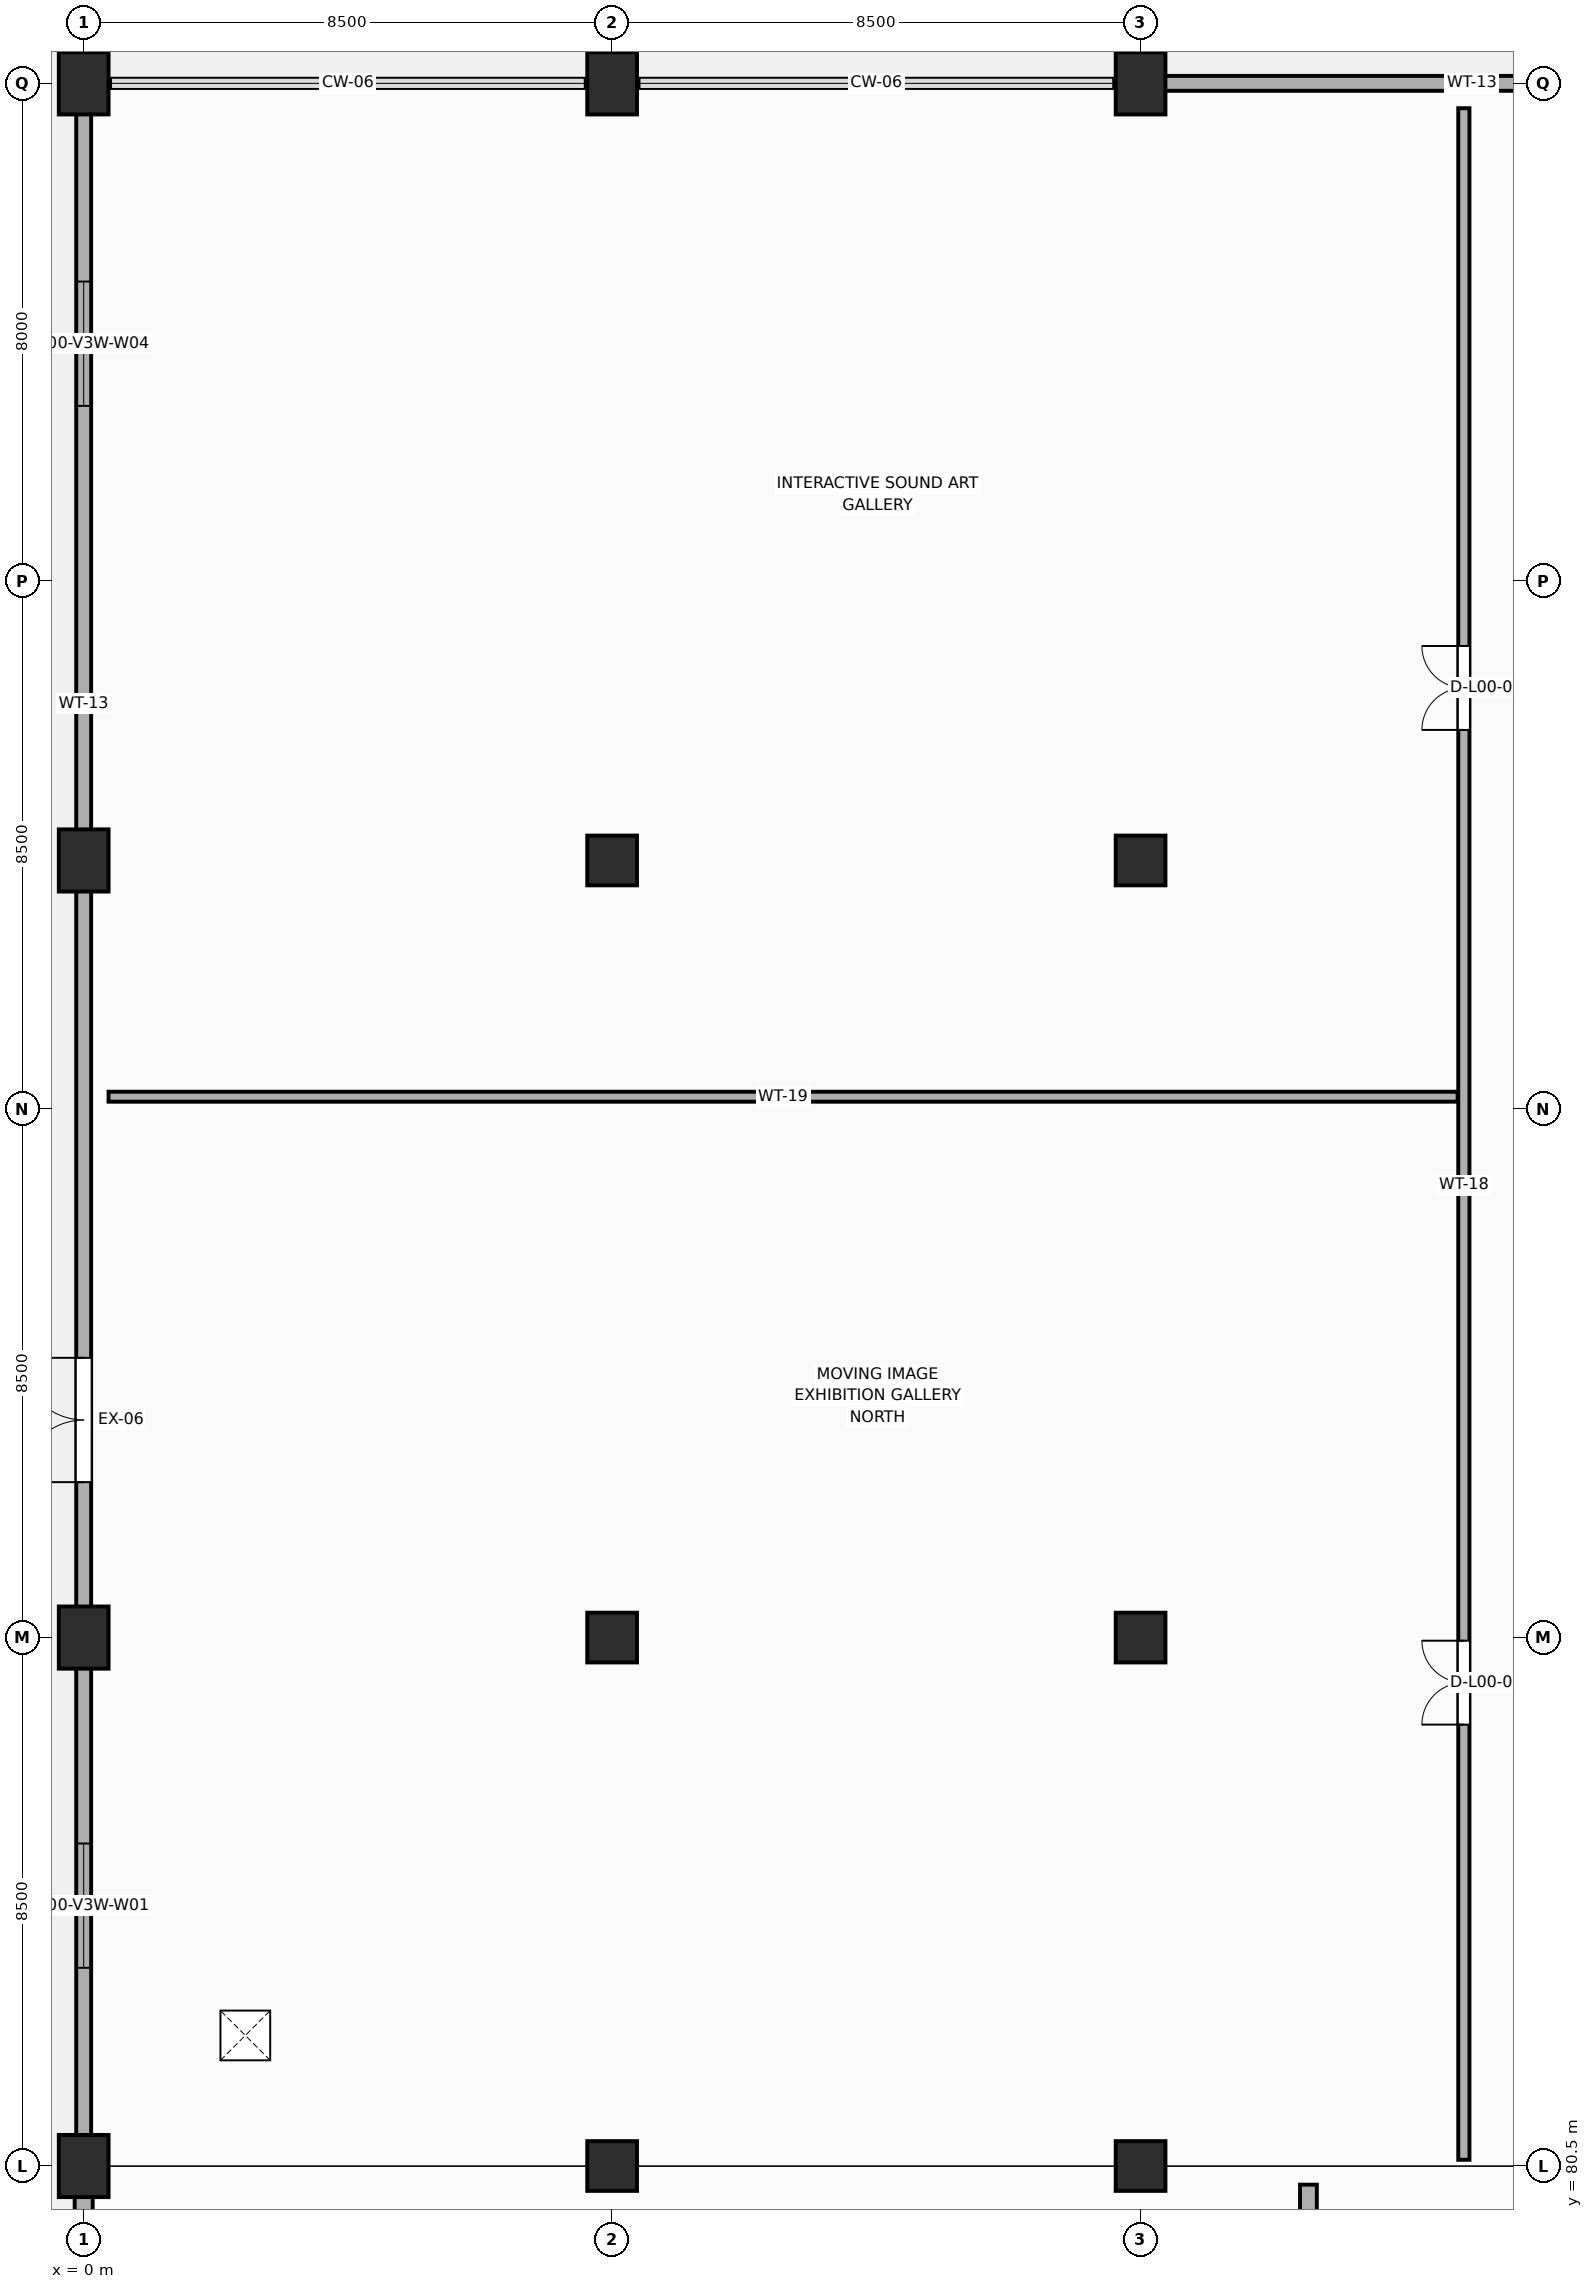
"""IFC4 building model, lengths in metres.
Left out: names, types, materials, properties, quantities, classifications, styles, units other than length and angle.
Written with IfcOpenShell. Run it as: python <this file> out.ifc"""

import sys

from ifc_helpers import new_model, si_unit, direction, frame, frame_2d, origin, origin_2d, place, context, subcontext, project, spatial, rectangle, extrude, element, fill, save


model = new_model("IFC4")
c1 = context("Model", 3, precision=1e-05, world=origin(), true_north=direction((0.0, 1.0)))
c2 = subcontext(c1, "Body", "Model", "MODEL_VIEW")
j1 = project(units=[si_unit("LENGTHUNIT", "METRE"), si_unit("PLANEANGLEUNIT", "RADIAN")], contexts=[c1])
p1 = place(None, origin())
s1 = spatial("IfcSite", under=j1, at=p1, CompositionType="ELEMENT")
p2 = place(p1, origin())
s2 = spatial("IfcBuilding", under=s1, at=p2, CompositionType="ELEMENT")
p3 = place(p2, origin())
s3 = spatial("IfcBuildingStorey", under=s2, at=p3, CompositionType="ELEMENT", Elevation=0.0)
for number, where, z_axis, x_axis in (
    (1, (0.0, 80.5, 0.0), (0.0, 0.0, 1.0), (1.0, 0.0, 0.0)),
    (2, (0.0, 89.0, 0.0), (0.0, 0.0, 1.0), (1.0, 0.0, 0.0)),
    (3, (0.0, 101.5, 0.0), (0.0, 0.0, 1.0), (1.0, 0.0, 0.0)),
    (4, (0.0, 114.0, 0.0), (0.0, 0.0, 1.0), (1.0, 0.0, 0.0)),
):
    element("IfcColumn", number, at=place(p3, frame(where, z_axis=z_axis, x_axis=x_axis)), inside=s3, PredefinedType="COLUMN", context=c2, shape_type="SweptSolid", body=[
        extrude(rectangle(XDim=0.8, YDim=1.0, at=origin_2d()), origin(), (0.0, 0.0, 1.0), 5.14),
    ])
for number, where, z_axis, x_axis in (
    (5, (8.5, 80.5, 0.0), (0.0, 0.0, 1.0), (1.0, 0.0, 0.0)),
    (6, (8.5, 89.0, 0.0), (0.0, 0.0, 1.0), (1.0, 0.0, 0.0)),
    (7, (8.5, 101.5, 0.0), (0.0, 0.0, 1.0), (1.0, 0.0, 0.0)),
):
    element("IfcColumn", number, at=place(p3, frame(where, z_axis=z_axis, x_axis=x_axis)), inside=s3, PredefinedType="COLUMN", context=c2, shape_type="SweptSolid", body=[
        extrude(rectangle(XDim=0.8, YDim=0.8, at=origin_2d()), origin(), (0.0, 0.0, 1.0), 5.14),
    ])
p4 = place(p3, frame((8.5, 114.0, 0.0), z_axis=(0.0, 0.0, 1.0), x_axis=(1.0, 0.0, 0.0)))
e8 = element("IfcColumn", 8, at=p4, inside=s3, PredefinedType="COLUMN", context=c2, shape_type="SweptSolid", body=[
    extrude(rectangle(XDim=0.8, YDim=1.0, at=origin_2d()), origin(), (0.0, 0.0, 1.0), 5.14),
])
for number, where, z_axis, x_axis in (
    (9, (17.0, 80.5, 0.0), (0.0, 0.0, 1.0), (1.0, 0.0, 0.0)),
    (10, (17.0, 89.0, 0.0), (0.0, 0.0, 1.0), (1.0, 0.0, 0.0)),
    (11, (17.0, 101.5, 0.0), (0.0, 0.0, 1.0), (1.0, 0.0, 0.0)),
):
    element("IfcColumn", number, at=place(p3, frame(where, z_axis=z_axis, x_axis=x_axis)), inside=s3, PredefinedType="COLUMN", context=c2, shape_type="SweptSolid", body=[
        extrude(rectangle(XDim=0.8, YDim=0.8, at=origin_2d()), origin(), (0.0, 0.0, 1.0), 5.14),
    ])
p5 = place(p3, frame((17.0, 114.0, 0.0), z_axis=(0.0, 0.0, 1.0), x_axis=(1.0, 0.0, 0.0)))
e12 = element("IfcColumn", 12, at=p5, inside=s3, PredefinedType="COLUMN", context=c2, shape_type="SweptSolid", body=[
    extrude(rectangle(XDim=0.8, YDim=1.0, at=origin_2d()), origin(), (0.0, 0.0, 1.0), 5.14),
])
p6 = place(p3, frame((0.0, 32.0, 0.0), z_axis=(0.0, 0.0, 1.0), x_axis=(0.0, 1.0, 0.0)))
e13 = element("IfcWall", 13, at=p6, inside=s3, PredefinedType="STANDARD", context=c2, shape_type="SweptSolid", body=[
    extrude(rectangle(XDim=48.5, YDim=0.29, at=frame_2d((24.25, 0.0))), origin(), (0.0, 0.0, 1.0), 4.28),
])
p7 = place(p6, frame((6.2, 0.0, 0.0)))
e14 = element("IfcOpeningElement", 14, at=p7, cuts=e13, PredefinedType="OPENING", context=c2, shape_type="SweptSolid", body=[
    extrude(rectangle(XDim=1.8, YDim=2.3, at=frame_2d((0.9, 1.15))), frame((0.0, 0.157, 0.0), z_axis=(0.0, -1.0, 0.0), x_axis=(1.0, 0.0, 0.0)), (0.0, 0.0, 1.0), 0.314),
])
p8 = place(p6, frame((38.2, 0.0, 0.0)))
e15 = element("IfcOpeningElement", 15, at=p8, cuts=e13, PredefinedType="OPENING", context=c2, shape_type="SweptSolid", body=[
    extrude(rectangle(XDim=1.8, YDim=2.3, at=frame_2d((0.9, 1.15))), frame((0.0, 0.157, 0.0), z_axis=(0.0, -1.0, 0.0), x_axis=(1.0, 0.0, 0.0)), (0.0, 0.0, 1.0), 0.314),
])
p9 = place(p6, frame((32.83, 0.0, 2.72)))
e16 = element("IfcOpeningElement", 16, at=p9, cuts=e13, PredefinedType="OPENING", context=c2, shape_type="SweptSolid", body=[
    extrude(rectangle(XDim=3.0, YDim=1.4, at=frame_2d((1.5, 0.7))), frame((0.0, 0.157, 0.0), z_axis=(0.0, -1.0, 0.0), x_axis=(1.0, 0.0, 0.0)), (0.0, 0.0, 1.0), 0.314),
])
p10 = place(p6, frame((42.15, 0.0, 2.72)))
e17 = element("IfcOpeningElement", 17, at=p10, cuts=e13, PredefinedType="OPENING", context=c2, shape_type="SweptSolid", body=[
    extrude(rectangle(XDim=3.0, YDim=1.4, at=frame_2d((1.5, 0.7))), frame((0.0, 0.157, 0.0), z_axis=(0.0, -1.0, 0.0), x_axis=(1.0, 0.0, 0.0)), (0.0, 0.0, 1.0), 0.314),
])
p11 = place(p3, frame((0.0, 80.5, 0.0), z_axis=(0.0, 0.0, 1.0), x_axis=(0.0, 1.0, 0.0)))
e18 = element("IfcWall", 18, at=p11, inside=s3, PredefinedType="STANDARD", context=c2, shape_type="SweptSolid", body=[
    extrude(rectangle(XDim=33.5, YDim=0.24, at=frame_2d((16.75, 0.0))), origin(), (0.0, 0.0, 1.0), 4.808),
])
p12 = place(p11, frame((11.0, 0.0, 0.0)))
e19 = element("IfcOpeningElement", 19, at=p12, cuts=e18, PredefinedType="OPENING", context=c2, shape_type="SweptSolid", body=[
    extrude(rectangle(XDim=2.0, YDim=2.4, at=frame_2d((1.0, 1.2))), frame((0.0, 0.132, 0.0), z_axis=(0.0, -1.0, 0.0), x_axis=(1.0, 0.0, 0.0)), (0.0, 0.0, 1.0), 0.264),
])
p13 = place(p11, frame((3.188, 0.0, 0.9)))
e20 = element("IfcOpeningElement", 20, at=p13, cuts=e18, PredefinedType="OPENING", context=c2, shape_type="SweptSolid", body=[
    extrude(rectangle(XDim=2.0, YDim=2.2, at=frame_2d((1.0, 1.1))), frame((0.0, 0.132, 0.0), z_axis=(0.0, -1.0, 0.0), x_axis=(1.0, 0.0, 0.0)), (0.0, 0.0, 1.0), 0.264),
])
p14 = place(p11, frame((28.312, 0.0, 0.9)))
e21 = element("IfcOpeningElement", 21, at=p14, cuts=e18, PredefinedType="OPENING", context=c2, shape_type="SweptSolid", body=[
    extrude(rectangle(XDim=2.0, YDim=2.2, at=frame_2d((1.0, 1.1))), frame((0.0, 0.132, 0.0), z_axis=(0.0, -1.0, 0.0), x_axis=(1.0, 0.0, 0.0)), (0.0, 0.0, 1.0), 0.264),
])
p15 = place(p3, frame((17.0, 114.0, 0.0), z_axis=(0.0, 0.0, 1.0), x_axis=(1.0, 0.0, 0.0)))
e22 = element("IfcWall", 22, at=p15, inside=s3, PredefinedType="STANDARD", context=c2, shape_type="SweptSolid", body=[
    extrude(rectangle(XDim=17.0, YDim=0.24, at=frame_2d((8.5, 0.0))), origin(), (0.0, 0.0, 1.0), 4.28),
])
p16 = place(p15, frame((11.2, 0.0, 0.0)))
e23 = element("IfcOpeningElement", 23, at=p16, cuts=e22, PredefinedType="OPENING", context=c2, shape_type="SweptSolid", body=[
    extrude(rectangle(XDim=2.0, YDim=2.4, at=frame_2d((1.0, 1.2))), frame((0.0, 0.132, 0.0), z_axis=(0.0, -1.0, 0.0), x_axis=(1.0, 0.0, 0.0)), (0.0, 0.0, 1.0), 0.264),
])
p17 = place(p3, frame((19.7, 32.2, 0.0), z_axis=(0.0, 0.0, 1.0), x_axis=(0.0, 1.0, 0.0)))
e24 = element("IfcWall", 24, at=p17, inside=s3, PredefinedType="PARTITIONING", context=c2, shape_type="SweptSolid", body=[
    extrude(rectangle(XDim=48.0, YDim=0.27, at=frame_2d((24.0, 0.0))), origin(), (0.0, 0.0, 1.0), 4.23),
])
p18 = place(p17, frame((6.5, 0.0, 0.0)))
e25 = element("IfcOpeningElement", 25, at=p18, cuts=e24, PredefinedType="OPENING", context=c2, shape_type="SweptSolid", body=[
    extrude(rectangle(XDim=1.8, YDim=2.4, at=frame_2d((0.9, 1.2))), frame((0.0, 0.147, 0.0), z_axis=(0.0, -1.0, 0.0), x_axis=(1.0, 0.0, 0.0)), (0.0, 0.0, 1.0), 0.294),
])
p19 = place(p17, frame((22.5, 0.0, 0.0)))
e26 = element("IfcOpeningElement", 26, at=p19, cuts=e24, PredefinedType="OPENING", context=c2, shape_type="SweptSolid", body=[
    extrude(rectangle(XDim=1.8, YDim=2.4, at=frame_2d((0.9, 1.2))), frame((0.0, 0.147, 0.0), z_axis=(0.0, -1.0, 0.0), x_axis=(1.0, 0.0, 0.0)), (0.0, 0.0, 1.0), 0.294),
])
p20 = place(p17, frame((38.5, 0.0, 0.0)))
e27 = element("IfcOpeningElement", 27, at=p20, cuts=e24, PredefinedType="OPENING", context=c2, shape_type="SweptSolid", body=[
    extrude(rectangle(XDim=1.8, YDim=2.4, at=frame_2d((0.9, 1.2))), frame((0.0, 0.147, 0.0), z_axis=(0.0, -1.0, 0.0), x_axis=(1.0, 0.0, 0.0)), (0.0, 0.0, 1.0), 0.294),
])
p21 = place(p3, frame((22.2, 80.6, 0.0), z_axis=(0.0, 0.0, 1.0), x_axis=(0.0, 1.0, 0.0)))
e28 = element("IfcWall", 28, at=p21, inside=s3, PredefinedType="PARTITIONING", context=c2, shape_type="SweptSolid", body=[
    extrude(rectangle(XDim=33.0, YDim=0.18, at=frame_2d((16.5, 0.0))), origin(), (0.0, 0.0, 1.0), 4.18),
])
p22 = place(p21, frame((7.0, 0.0, 0.0)))
e29 = element("IfcOpeningElement", 29, at=p22, cuts=e28, PredefinedType="OPENING", context=c2, shape_type="SweptSolid", body=[
    extrude(rectangle(XDim=1.35, YDim=2.25, at=frame_2d((0.675, 1.125))), frame((0.0, 0.102, 0.0), z_axis=(0.0, -1.0, 0.0), x_axis=(1.0, 0.0, 0.0)), (0.0, 0.0, 1.0), 0.204),
])
p23 = place(p21, frame((23.0, 0.0, 0.0)))
e30 = element("IfcOpeningElement", 30, at=p23, cuts=e28, PredefinedType="OPENING", context=c2, shape_type="SweptSolid", body=[
    extrude(rectangle(XDim=1.35, YDim=2.25, at=frame_2d((0.675, 1.125))), frame((0.0, 0.102, 0.0), z_axis=(0.0, -1.0, 0.0), x_axis=(1.0, 0.0, 0.0)), (0.0, 0.0, 1.0), 0.204),
])
p24 = place(p3, frame((0.4, 97.7, 0.0), z_axis=(0.0, 0.0, 1.0), x_axis=(1.0, 0.0, 0.0)))
e31 = element("IfcWall", 31, at=p24, inside=s3, PredefinedType="PARTITIONING", context=c2, shape_type="SweptSolid", body=[
    extrude(rectangle(XDim=21.7, YDim=0.16, at=frame_2d((10.85, 0.0))), origin(), (0.0, 0.0, 1.0), 4.18),
])
p25 = place(p12, origin())
e32 = element("IfcDoor", 32, at=p25, inside=s3, OperationType="DOUBLE_DOOR_SINGLE_SWING", PredefinedType="DOOR", context=c2, shape_type="SweptSolid", body=[
    extrude(rectangle(XDim=2.0, YDim=2.4, at=frame_2d((1.0, 1.2))), frame((0.0, 0.025, 0.0), z_axis=(0.0, -1.0, 0.0), x_axis=(1.0, 0.0, 0.0)), (0.0, 0.0, 1.0), 0.05),
])
fill(e19, e32)
p26 = place(p13, origin())
e33 = element("IfcWindow", 33, at=p26, inside=s3, PartitioningType="SINGLE_PANEL", PredefinedType="WINDOW", context=c2, shape_type="SweptSolid", body=[
    extrude(rectangle(XDim=2.0, YDim=2.2, at=frame_2d((1.0, 1.1))), frame((0.0, 0.03, 0.0), z_axis=(0.0, -1.0, 0.0), x_axis=(1.0, 0.0, 0.0)), (0.0, 0.0, 1.0), 0.06),
])
fill(e20, e33)
p27 = place(p14, origin())
e34 = element("IfcWindow", 34, at=p27, inside=s3, PartitioningType="SINGLE_PANEL", PredefinedType="WINDOW", context=c2, shape_type="SweptSolid", body=[
    extrude(rectangle(XDim=2.0, YDim=2.2, at=frame_2d((1.0, 1.1))), frame((0.0, 0.03, 0.0), z_axis=(0.0, -1.0, 0.0), x_axis=(1.0, 0.0, 0.0)), (0.0, 0.0, 1.0), 0.06),
])
fill(e21, e34)
p28 = place(p22, origin())
e35 = element("IfcDoor", 35, at=p28, inside=s3, OperationType="DOUBLE_DOOR_SINGLE_SWING", PredefinedType="DOOR", context=c2, shape_type="SweptSolid", body=[
    extrude(rectangle(XDim=1.35, YDim=2.25, at=frame_2d((0.675, 1.125))), frame((0.0, 0.025, 0.0), z_axis=(0.0, -1.0, 0.0), x_axis=(1.0, 0.0, 0.0)), (0.0, 0.0, 1.0), 0.05),
])
fill(e29, e35)
p29 = place(p23, origin())
e36 = element("IfcDoor", 36, at=p29, inside=s3, OperationType="DOUBLE_DOOR_SINGLE_SWING", PredefinedType="DOOR", context=c2, shape_type="SweptSolid", body=[
    extrude(rectangle(XDim=1.35, YDim=2.25, at=frame_2d((0.675, 1.125))), frame((0.0, 0.025, 0.0), z_axis=(0.0, -1.0, 0.0), x_axis=(1.0, 0.0, 0.0)), (0.0, 0.0, 1.0), 0.05),
])
fill(e30, e36)
save(model, sys.argv[1])
